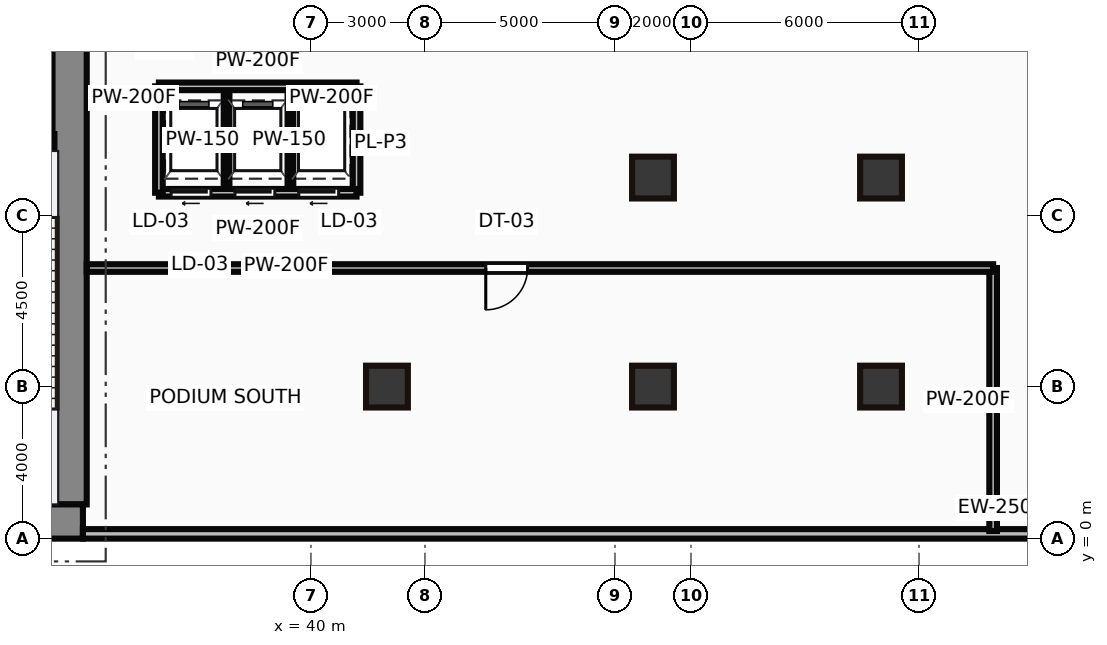
"""IFC4 building model, lengths in metres.
Left out: names, types, materials, properties, quantities, classifications, styles, units other than length and angle.
Written with IfcOpenShell. Run it as: python <this file> out.ifc"""

import sys

from ifc_helpers import new_model, si_unit, direction, frame, frame_2d, origin, origin_2d, place, context, subcontext, project, spatial, rectangle, hollow_rectangle, extrude, source, transform, mapped, element, fill, save


model = new_model("IFC4")
c1 = context("Model", 3, precision=1e-05, world=origin(), true_north=direction((0.0, 1.0)))
c2 = subcontext(c1, "Body", "Model", "MODEL_VIEW")
j1 = project(units=[si_unit("LENGTHUNIT", "METRE"), si_unit("PLANEANGLEUNIT", "RADIAN")], contexts=[c1])
p1 = place(None, origin())
s1 = spatial("IfcSite", under=j1, at=p1, CompositionType="ELEMENT")
p2 = place(p1, origin())
s2 = spatial("IfcBuilding", under=s1, at=p2, CompositionType="ELEMENT")
p3 = place(p2, frame((0.0, 0.0, 26.0)))
s3 = spatial("IfcBuildingStorey", under=s2, at=p3, CompositionType="ELEMENT", Elevation=26.0)
m1 = source(origin(), c2, "Body", "SweptSolid", [
    extrude(rectangle(XDim=29.5, YDim=0.9, at=frame_2d((14.75, 0.0))), origin(), (0.0, 0.0, 1.0), 6.5),
])
p4 = place(p3, frame((4.5, 0.45, 0.0), z_axis=(0.0, 0.0, 1.0), x_axis=(1.0, 0.0, 0.0)))
e1 = element("IfcWall", 1, at=p4, inside=s3, PredefinedType="SHEAR", context=c2, shape_type="MappedRepresentation", body=[
    mapped(m1, transform((0.0, 0.0, 0.0))),
])
m2 = source(origin(), c2, "Body", "SweptSolid", [
    extrude(rectangle(XDim=13.1, YDim=0.9, at=frame_2d((6.55, 0.0))), origin(), (0.0, 0.0, 1.0), 6.5),
])
p5 = place(p3, frame((33.65, 0.9, 0.0), z_axis=(0.0, 0.0, 1.0), x_axis=(0.0, 1.0, 0.0)))
e2 = element("IfcWall", 2, at=p5, inside=s3, PredefinedType="SHEAR", context=c2, shape_type="MappedRepresentation", body=[
    mapped(m2, transform((0.0, 0.0, 0.0))),
])
m3 = source(origin(), c2, "Body", "SweptSolid", [
    extrude(rectangle(XDim=3.39, YDim=0.45, at=frame_2d((1.695, 0.0))), origin(), (0.0, 0.0, 1.0), 6.5),
])
p6 = place(p3, frame((29.86, 10.42, 0.0), z_axis=(0.0, 0.0, 1.0), x_axis=(1.0, 0.0, 0.0)))
e3 = element("IfcWall", 3, at=p6, inside=s3, PredefinedType="SHEAR", context=c2, shape_type="MappedRepresentation", body=[
    mapped(m3, transform((0.0, 0.0, 0.0))),
])
p7 = place(p6, frame((1.1, 0.0, 0.0)))
e4 = element("IfcOpeningElement", 4, at=p7, cuts=e3, PredefinedType="OPENING", context=c2, shape_type="SweptSolid", body=[
    extrude(rectangle(XDim=1.1, YDim=2.15, at=frame_2d((0.55, 1.075))), frame((0.0, 0.235, 0.0), z_axis=(0.0, -1.0, 0.0), x_axis=(1.0, 0.0, 0.0)), (0.0, 0.0, 1.0), 0.47),
])
m4 = source(origin(), c2, "Body", "SweptSolid", [
    extrude(hollow_rectangle(XDim=1.1, YDim=1.1, WallThickness=0.05, at=origin_2d()), origin(), (0.0, 0.0, 1.0), 6.5),
])
for number, where, z_axis, x_axis in (
    (5, (49.0, 9.5, 0.0), (0.0, 0.0, 1.0), (1.0, 0.0, 0.0)),
    (6, (55.0, 9.5, 0.0), (0.0, 0.0, 1.0), (1.0, 0.0, 0.0)),
    (7, (42.0, 4.0, 0.0), (0.0, 0.0, 1.0), (1.0, 0.0, 0.0)),
    (8, (49.0, 4.0, 0.0), (0.0, 0.0, 1.0), (1.0, 0.0, 0.0)),
    (9, (55.0, 4.0, 0.0), (0.0, 0.0, 1.0), (1.0, 0.0, 0.0)),
):
    element("IfcColumn", number, at=place(p3, frame(where, z_axis=z_axis, x_axis=x_axis)), inside=s3, PredefinedType="PILASTER", context=c2, shape_type="MappedRepresentation", body=[
        mapped(m4, transform((0.0, 0.0, 0.0))),
    ])
m5 = source(origin(), c2, "Body", "SweptSolid", [
    extrude(rectangle(XDim=48.0, YDim=0.25, at=frame_2d((24.0, 0.0))), origin(), (0.0, 0.0, 1.0), 6.25),
])
p8 = place(p3, frame((34.0, 0.125, 0.0), z_axis=(0.0, 0.0, 1.0), x_axis=(1.0, 0.0, 0.0)))
e10 = element("IfcWall", 10, at=p8, inside=s3, PredefinedType="STANDARD", context=c2, shape_type="MappedRepresentation", body=[
    mapped(m5, transform((0.0, 0.0, 0.0))),
])
m6 = source(origin(), c2, "Body", "SweptSolid", [
    extrude(rectangle(XDim=5.2, YDim=0.2, at=frame_2d((2.6, 0.0))), origin(), (0.0, 0.0, 1.0), 6.25),
])
p9 = place(p3, frame((36.0, 9.1, 0.0), z_axis=(0.0, 0.0, 1.0), x_axis=(1.0, 0.0, 0.0)))
e11 = element("IfcWall", 11, at=p9, inside=s3, PredefinedType="PARTITIONING", context=c2, shape_type="MappedRepresentation", body=[
    mapped(m6, transform((0.0, 0.0, 0.0))),
])
p10 = place(p9, frame((0.32, 0.0, 0.0)))
e12 = element("IfcOpeningElement", 12, at=p10, cuts=e11, PredefinedType="OPENING", context=c2, shape_type="SweptSolid", body=[
    extrude(rectangle(XDim=1.05, YDim=2.15, at=frame_2d((0.525, 1.075))), frame((0.0, 0.11, 0.0), z_axis=(0.0, -1.0, 0.0), x_axis=(1.0, 0.0, 0.0)), (0.0, 0.0, 1.0), 0.22),
])
p11 = place(p9, frame((2.0, 0.0, 0.0)))
e13 = element("IfcOpeningElement", 13, at=p11, cuts=e11, PredefinedType="OPENING", context=c2, shape_type="SweptSolid", body=[
    extrude(rectangle(XDim=1.05, YDim=2.15, at=frame_2d((0.525, 1.075))), frame((0.0, 0.11, 0.0), z_axis=(0.0, -1.0, 0.0), x_axis=(1.0, 0.0, 0.0)), (0.0, 0.0, 1.0), 0.22),
])
p12 = place(p9, frame((3.68, 0.0, 0.0)))
e14 = element("IfcOpeningElement", 14, at=p12, cuts=e11, PredefinedType="OPENING", context=c2, shape_type="SweptSolid", body=[
    extrude(rectangle(XDim=1.05, YDim=2.15, at=frame_2d((0.525, 1.075))), frame((0.0, 0.11, 0.0), z_axis=(0.0, -1.0, 0.0), x_axis=(1.0, 0.0, 0.0)), (0.0, 0.0, 1.0), 0.22),
])
p13 = place(p3, frame((36.0, 11.9, 0.0), z_axis=(0.0, 0.0, 1.0), x_axis=(1.0, 0.0, 0.0)))
e15 = element("IfcWall", 15, at=p13, inside=s3, PredefinedType="PARTITIONING", context=c2, shape_type="MappedRepresentation", body=[
    mapped(m6, transform((0.0, 0.0, 0.0))),
])
m7 = source(origin(), c2, "Body", "SweptSolid", [
    extrude(rectangle(XDim=2.8, YDim=0.2, at=frame_2d((1.4, 0.0))), origin(), (0.0, 0.0, 1.0), 6.25),
])
for number, where, z_axis, x_axis in (
    (16, (36.0, 9.1, 0.0), (0.0, 0.0, 1.0), (0.0, 1.0, 0.0)),
    (17, (41.2, 9.1, 0.0), (0.0, 0.0, 1.0), (0.0, 1.0, 0.0)),
):
    element("IfcWall", number, at=place(p3, frame(where, z_axis=z_axis, x_axis=x_axis)), inside=s3, PredefinedType="PARTITIONING", context=c2, shape_type="MappedRepresentation", body=[
        mapped(m7, transform((0.0, 0.0, 0.0))),
    ])
m8 = source(origin(), c2, "Body", "SweptSolid", [
    extrude(rectangle(XDim=2.7, YDim=0.15, at=frame_2d((1.35, 0.0))), origin(), (0.0, 0.0, 1.0), 6.25),
])
for number, where, z_axis, x_axis in (
    (18, (37.78, 9.15, 0.0), (0.0, 0.0, 1.0), (0.0, 1.0, 0.0)),
    (19, (39.46, 9.15, 0.0), (0.0, 0.0, 1.0), (0.0, 1.0, 0.0)),
):
    element("IfcWall", number, at=place(p3, frame(where, z_axis=z_axis, x_axis=x_axis)), inside=s3, PredefinedType="PARTITIONING", context=c2, shape_type="MappedRepresentation", body=[
        mapped(m8, transform((0.0, 0.0, 0.0))),
    ])
m9 = source(origin(), c2, "Body", "SweptSolid", [
    extrude(rectangle(XDim=23.85, YDim=0.2, at=frame_2d((11.925, 0.0))), origin(), (0.0, 0.0, 1.0), 6.25),
])
p14 = place(p3, frame((34.1, 7.12, 0.0), z_axis=(0.0, 0.0, 1.0), x_axis=(1.0, 0.0, 0.0)))
e20 = element("IfcWall", 20, at=p14, inside=s3, PredefinedType="PARTITIONING", context=c2, shape_type="MappedRepresentation", body=[
    mapped(m9, transform((0.0, 0.0, 0.0))),
])
p15 = place(p14, frame((10.5, 0.0, 0.0)))
e21 = element("IfcOpeningElement", 21, at=p15, cuts=e20, PredefinedType="OPENING", context=c2, shape_type="SweptSolid", body=[
    extrude(rectangle(XDim=1.1, YDim=2.15, at=frame_2d((0.55, 1.075))), frame((0.0, 0.11, 0.0), z_axis=(0.0, -1.0, 0.0), x_axis=(1.0, 0.0, 0.0)), (0.0, 0.0, 1.0), 0.22),
])
m10 = source(origin(), c2, "Body", "SweptSolid", [
    extrude(rectangle(XDim=6.92, YDim=0.2, at=frame_2d((3.46, 0.0))), origin(), (0.0, 0.0, 1.0), 6.25),
])
p16 = place(p3, frame((57.95, 0.2, 0.0), z_axis=(0.0, 0.0, 1.0), x_axis=(0.0, 1.0, 0.0)))
e22 = element("IfcWall", 22, at=p16, inside=s3, PredefinedType="PARTITIONING", context=c2, shape_type="MappedRepresentation", body=[
    mapped(m10, transform((0.0, 0.0, 0.0))),
])
m11 = source(origin(), c2, "Body", "SweptSolid", [
    extrude(rectangle(XDim=1.05, YDim=2.15, at=frame_2d((0.525, 1.075))), frame((0.0, 0.025, 0.0), z_axis=(0.0, -1.0, 0.0), x_axis=(1.0, 0.0, 0.0)), (0.0, 0.0, 1.0), 0.05),
])
p17 = place(p10, frame((1.05, 0.0, 0.0), z_axis=(0.0, 0.0, 1.0), x_axis=(-1.0, 0.0, 0.0)))
e23 = element("IfcDoor", 23, at=p17, inside=s3, OperationType="SLIDING_TO_LEFT", PredefinedType="DOOR", context=c2, shape_type="MappedRepresentation", body=[
    mapped(m11, transform((0.0, 0.0, 0.0))),
])
fill(e12, e23)
p18 = place(p11, frame((1.05, 0.0, 0.0), z_axis=(0.0, 0.0, 1.0), x_axis=(-1.0, 0.0, 0.0)))
e24 = element("IfcDoor", 24, at=p18, inside=s3, OperationType="SLIDING_TO_LEFT", PredefinedType="DOOR", context=c2, shape_type="MappedRepresentation", body=[
    mapped(m11, transform((0.0, 0.0, 0.0))),
])
fill(e13, e24)
p19 = place(p12, frame((1.05, 0.0, 0.0), z_axis=(0.0, 0.0, 1.0), x_axis=(-1.0, 0.0, 0.0)))
e25 = element("IfcDoor", 25, at=p19, inside=s3, OperationType="SLIDING_TO_LEFT", PredefinedType="DOOR", context=c2, shape_type="MappedRepresentation", body=[
    mapped(m11, transform((0.0, 0.0, 0.0))),
])
fill(e14, e25)
m12 = source(origin(), c2, "Body", "SweptSolid", [
    extrude(rectangle(XDim=1.1, YDim=2.15, at=frame_2d((0.55, 1.075))), frame((0.0, 0.025, 0.0), z_axis=(0.0, -1.0, 0.0), x_axis=(1.0, 0.0, 0.0)), (0.0, 0.0, 1.0), 0.05),
])
p20 = place(p15, frame((1.1, 0.0, 0.0), z_axis=(0.0, 0.0, 1.0), x_axis=(-1.0, 0.0, 0.0)))
e26 = element("IfcDoor", 26, at=p20, inside=s3, OperationType="SINGLE_SWING_LEFT", PredefinedType="DOOR", context=c2, shape_type="MappedRepresentation", body=[
    mapped(m12, transform((0.0, 0.0, 0.0))),
])
fill(e21, e26)
save(model, sys.argv[1])
